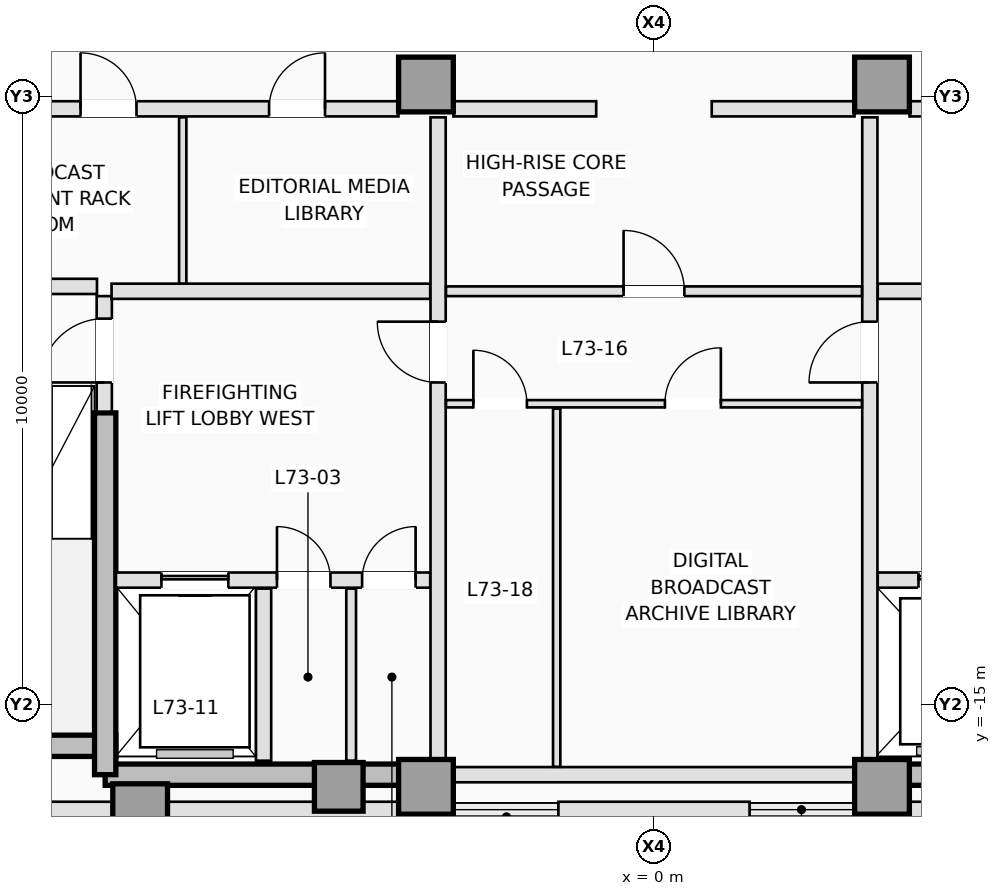
"""IFC4 building model, lengths in metres.
Left out: names, types, materials, properties, quantities, classifications, styles, units other than length and angle.
Written with IfcOpenShell. Run it as: python <this file> out.ifc"""

import sys

from ifc_helpers import new_model, si_unit, direction, frame, frame_2d, origin, origin_2d, place, context, subcontext, project, spatial, rectangle, extrude, element, fill, save


model = new_model("IFC4")
c1 = context("Model", 3, precision=1e-05, world=origin(), true_north=direction((0.0, 1.0)))
c2 = subcontext(c1, "Body", "Model", "MODEL_VIEW")
j1 = project(units=[si_unit("LENGTHUNIT", "METRE"), si_unit("PLANEANGLEUNIT", "RADIAN")], contexts=[c1])
p1 = place(None, origin())
s1 = spatial("IfcSite", under=j1, at=p1, CompositionType="ELEMENT")
p2 = place(p1, origin())
s2 = spatial("IfcBuilding", under=s1, at=p2, CompositionType="ELEMENT")
p3 = place(p2, frame((0.0, 0.0, 263.9)))
s3 = spatial("IfcBuildingStorey", under=s2, at=p3, CompositionType="ELEMENT", Elevation=263.9)
p4 = place(p3, frame((-12.55, -15.675, 0.0), z_axis=(0.0, 0.0, 1.0), x_axis=(1.0, 0.0, 0.0)))
e1 = element("IfcWall", 1, at=p4, inside=s3, PredefinedType="SHEAR", context=c2, shape_type="SweptSolid", body=[
    extrude(rectangle(XDim=3.7, YDim=0.35, at=frame_2d((1.85, 0.0))), origin(), (0.0, 0.0, 1.0), 3.5),
])
for number, where, z_axis, x_axis in (
    (2, (-9.025, -16.15, 0.0), (0.0, 0.0, 1.0), (1.0, 0.0, 0.0)),
    (3, (3.75, -16.15, 0.0), (0.0, 0.0, 1.0), (1.0, 0.0, 0.0)),
):
    element("IfcWall", number, at=place(p3, frame(where, z_axis=z_axis, x_axis=x_axis)), inside=s3, PredefinedType="SHEAR", context=c2, shape_type="SweptSolid", body=[
        extrude(rectangle(XDim=5.275, YDim=0.35, at=frame_2d((2.637, 0.0))), origin(), (0.0, 0.0, 1.0), 3.5),
    ])
p5 = place(p3, frame((-9.025, -16.15, 0.0), z_axis=(0.0, 0.0, 1.0), x_axis=(0.0, 1.0, 0.0)))
e4 = element("IfcWall", 4, at=p5, inside=s3, PredefinedType="SHEAR", context=c2, shape_type="SweptSolid", body=[
    extrude(rectangle(XDim=5.95, YDim=0.35, at=frame_2d((2.975, 0.0))), origin(), (0.0, 0.0, 1.0), 3.5),
])
for number, where, z_axis, x_axis in (
    (5, (-8.45, -16.75, 0.0), (0.0, 0.0, 1.0), (1.0, 0.0, 0.0)),
    (6, (-3.75, -16.35, 0.0), (0.0, 0.0, 1.0), (1.0, 0.0, 0.0)),
    (7, (3.75, -16.35, 0.0), (0.0, 0.0, 1.0), (1.0, 0.0, 0.0)),
    (8, (-3.75, -4.8, 0.0), (0.0, 0.0, 1.0), (1.0, 0.0, 0.0)),
    (9, (3.75, -4.8, 0.0), (0.0, 0.0, 1.0), (1.0, 0.0, 0.0)),
):
    element("IfcColumn", number, at=place(p3, frame(where, z_axis=z_axis, x_axis=x_axis)), inside=s3, PredefinedType="COLUMN", context=c2, shape_type="SweptSolid", body=[
        extrude(rectangle(XDim=0.9, YDim=0.9, at=origin_2d()), origin(), (0.0, 0.0, 1.0), 3.5),
    ])
p6 = place(p3, frame((-5.184, -16.35, 0.0), z_axis=(0.0, 0.0, 1.0), x_axis=(0.0, 1.0, 0.0)))
e10 = element("IfcColumn", 10, at=p6, inside=s3, PredefinedType="COLUMN", context=c2, shape_type="SweptSolid", body=[
    extrude(rectangle(XDim=0.8, YDim=0.8, at=origin_2d()), origin(), (0.0, 0.0, 1.0), 3.5),
])
for number, where, z_axis, x_axis in (
    (11, (15.493, -16.725, 0.0), (0.0, 0.0, 1.0), (-1.0, 0.0, 0.0)),
    (12, (-4.22, -16.725, 0.0), (0.0, 0.0, 1.0), (-1.0, 0.0, 0.0)),
):
    element("IfcWall", number, at=place(p3, frame(where, z_axis=z_axis, x_axis=x_axis)), inside=s3, PredefinedType="STANDARD", context=c2, shape_type="SweptSolid", body=[
        extrude(rectangle(XDim=11.273, YDim=0.26, at=frame_2d((5.636, 0.0))), origin(), (0.0, 0.0, 1.0), 2.79),
    ])
p7 = place(p3, frame((1.572, -16.725, 0.0), z_axis=(0.0, 0.0, 1.0), x_axis=(-1.0, 0.0, 0.0)))
e13 = element("IfcWall", 13, at=p7, inside=s3, PredefinedType="STANDARD", context=c2, shape_type="SweptSolid", body=[
    extrude(rectangle(XDim=3.143, YDim=0.26, at=frame_2d((1.572, 0.0))), origin(), (0.0, 0.0, 1.0), 3.25),
])
p8 = place(p3, frame((-9.04, -10.18, 0.0), z_axis=(0.0, 0.0, 1.0), x_axis=(0.0, 1.0, 0.0)))
e14 = element("IfcWall", 14, at=p8, inside=s3, PredefinedType="PARTITIONING", context=c2, shape_type="SweptSolid", body=[
    extrude(rectangle(XDim=1.9, YDim=0.25, at=frame_2d((0.95, 0.0))), origin(), (0.0, 0.0, 1.0), 3.25),
])
p9 = place(p8, frame((0.48, 0.0, 0.0)))
e15 = element("IfcOpeningElement", 15, at=p9, cuts=e14, PredefinedType="OPENING", context=c2, shape_type="SweptSolid", body=[
    extrude(rectangle(XDim=1.05, YDim=2.15, at=frame_2d((0.525, 1.075))), frame((0.0, 0.135, 0.0), z_axis=(0.0, -1.0, 0.0), x_axis=(1.0, 0.0, 0.0)), (0.0, 0.0, 1.0), 0.27),
])
p10 = place(p3, frame((-12.38, -8.12, 0.0), z_axis=(0.0, 0.0, 1.0), x_axis=(1.0, 0.0, 0.0)))
e16 = element("IfcWall", 16, at=p10, inside=s3, PredefinedType="PARTITIONING", context=c2, shape_type="SweptSolid", body=[
    extrude(rectangle(XDim=3.22, YDim=0.25, at=frame_2d((1.61, 0.0))), origin(), (0.0, 0.0, 1.0), 3.25),
])
p11 = place(p3, frame((-8.848, -12.95, 0.0), z_axis=(0.0, 0.0, 1.0), x_axis=(1.0, 0.0, 0.0)))
e17 = element("IfcWall", 17, at=p11, inside=s3, PredefinedType="PARTITIONING", context=c2, shape_type="SweptSolid", body=[
    extrude(rectangle(XDim=5.168, YDim=0.25, at=frame_2d((2.584, 0.0))), origin(), (0.0, 0.0, 1.0), 3.25),
])
p12 = place(p11, frame((0.748, 0.0, 0.0)))
e18 = element("IfcOpeningElement", 18, at=p12, cuts=e17, PredefinedType="OPENING", context=c2, shape_type="SweptSolid", body=[
    extrude(rectangle(XDim=1.1, YDim=2.15, at=frame_2d((0.55, 1.075))), frame((0.0, 0.135, 0.0), z_axis=(0.0, -1.0, 0.0), x_axis=(1.0, 0.0, 0.0)), (0.0, 0.0, 1.0), 0.27),
])
p13 = place(p11, frame((2.648, 0.0, 0.0)))
e19 = element("IfcOpeningElement", 19, at=p13, cuts=e17, PredefinedType="OPENING", context=c2, shape_type="SweptSolid", body=[
    extrude(rectangle(XDim=0.88, YDim=2.1, at=frame_2d((0.44, 1.05))), frame((0.0, 0.135, 0.0), z_axis=(0.0, -1.0, 0.0), x_axis=(1.0, 0.0, 0.0)), (0.0, 0.0, 1.0), 0.27),
])
p14 = place(p11, frame((4.048, 0.0, 0.0)))
e20 = element("IfcOpeningElement", 20, at=p14, cuts=e17, PredefinedType="OPENING", context=c2, shape_type="SweptSolid", body=[
    extrude(rectangle(XDim=0.88, YDim=2.1, at=frame_2d((0.44, 1.05))), frame((0.0, 0.135, 0.0), z_axis=(0.0, -1.0, 0.0), x_axis=(1.0, 0.0, 0.0)), (0.0, 0.0, 1.0), 0.27),
])
p15 = place(p3, frame((3.68, -12.95, 0.0), z_axis=(0.0, 0.0, 1.0), x_axis=(1.0, 0.0, 0.0)))
e21 = element("IfcWall", 21, at=p15, inside=s3, PredefinedType="PARTITIONING", context=c2, shape_type="SweptSolid", body=[
    extrude(rectangle(XDim=5.168, YDim=0.25, at=frame_2d((2.584, 0.0))), origin(), (0.0, 0.0, 1.0), 3.25),
])
p16 = place(p15, frame((3.32, 0.0, 0.0)))
e22 = element("IfcOpeningElement", 22, at=p16, cuts=e21, PredefinedType="OPENING", context=c2, shape_type="SweptSolid", body=[
    extrude(rectangle(XDim=1.1, YDim=2.15, at=frame_2d((0.55, 1.075))), frame((0.0, 0.135, 0.0), z_axis=(0.0, -1.0, 0.0), x_axis=(1.0, 0.0, 0.0)), (0.0, 0.0, 1.0), 0.27),
])
p17 = place(p15, frame((0.67, 0.0, 0.0)))
e23 = element("IfcOpeningElement", 23, at=p17, cuts=e21, PredefinedType="OPENING", context=c2, shape_type="SweptSolid", body=[
    extrude(rectangle(XDim=1.2, YDim=2.15, at=frame_2d((0.6, 1.075))), frame((0.0, 0.135, 0.0), z_axis=(0.0, -1.0, 0.0), x_axis=(1.0, 0.0, 0.0)), (0.0, 0.0, 1.0), 0.27),
])
p18 = place(p3, frame((-6.42, -15.92, 0.0), z_axis=(0.0, 0.0, 1.0), x_axis=(0.0, 1.0, 0.0)))
e24 = element("IfcWall", 24, at=p18, inside=s3, PredefinedType="PARTITIONING", context=c2, shape_type="SweptSolid", body=[
    extrude(rectangle(XDim=2.83, YDim=0.25, at=frame_2d((1.415, 0.0))), origin(), (0.0, 0.0, 1.0), 3.25),
])
p19 = place(p3, frame((-4.98, -15.92, 0.0), z_axis=(0.0, 0.0, 1.0), x_axis=(0.0, 1.0, 0.0)))
e25 = element("IfcWall", 25, at=p19, inside=s3, PredefinedType="PARTITIONING", context=c2, shape_type="SweptSolid", body=[
    extrude(rectangle(XDim=2.83, YDim=0.16, at=frame_2d((1.415, 0.0))), origin(), (0.0, 0.0, 1.0), 3.25),
])
for number, where, z_axis, x_axis in (
    (26, (-8.92, -8.2, 0.0), (0.0, 0.0, 1.0), (1.0, 0.0, 0.0)),
    (27, (3.68, -8.2, 0.0), (0.0, 0.0, 1.0), (1.0, 0.0, 0.0)),
):
    element("IfcWall", number, at=place(p3, frame(where, z_axis=z_axis, x_axis=x_axis)), inside=s3, PredefinedType="PARTITIONING", context=c2, shape_type="SweptSolid", body=[
        extrude(rectangle(XDim=5.24, YDim=0.25, at=frame_2d((2.62, 0.0))), origin(), (0.0, 0.0, 1.0), 3.25),
    ])
p20 = place(p3, frame((-3.55, -15.898, 0.0), z_axis=(0.0, 0.0, 1.0), x_axis=(0.0, 1.0, 0.0)))
e28 = element("IfcWall", 28, at=p20, inside=s3, PredefinedType="PARTITIONING", context=c2, shape_type="SweptSolid", body=[
    extrude(rectangle(XDim=10.558, YDim=0.25, at=frame_2d((5.279, 0.0))), origin(), (0.0, 0.0, 1.0), 3.25),
])
p21 = place(p20, frame((6.198, 0.0, 0.0)))
e29 = element("IfcOpeningElement", 29, at=p21, cuts=e28, PredefinedType="OPENING", context=c2, shape_type="SweptSolid", body=[
    extrude(rectangle(XDim=1.0, YDim=2.15, at=frame_2d((0.5, 1.075))), frame((0.0, 0.135, 0.0), z_axis=(0.0, -1.0, 0.0), x_axis=(1.0, 0.0, 0.0)), (0.0, 0.0, 1.0), 0.27),
])
p22 = place(p3, frame((3.55, -15.898, 0.0), z_axis=(0.0, 0.0, 1.0), x_axis=(0.0, 1.0, 0.0)))
e30 = element("IfcWall", 30, at=p22, inside=s3, PredefinedType="PARTITIONING", context=c2, shape_type="SweptSolid", body=[
    extrude(rectangle(XDim=10.558, YDim=0.25, at=frame_2d((5.279, 0.0))), origin(), (0.0, 0.0, 1.0), 3.25),
])
p23 = place(p22, frame((6.198, 0.0, 0.0)))
e31 = element("IfcOpeningElement", 31, at=p23, cuts=e30, PredefinedType="OPENING", context=c2, shape_type="SweptSolid", body=[
    extrude(rectangle(XDim=1.0, YDim=2.15, at=frame_2d((0.5, 1.075))), frame((0.0, 0.135, 0.0), z_axis=(0.0, -1.0, 0.0), x_axis=(1.0, 0.0, 0.0)), (0.0, 0.0, 1.0), 0.27),
])
p24 = place(p3, frame((-12.48, -5.2, 0.0), z_axis=(0.0, 0.0, 1.0), x_axis=(1.0, 0.0, 0.0)))
e32 = element("IfcWall", 32, at=p24, inside=s3, PredefinedType="PARTITIONING", context=c2, shape_type="SweptSolid", body=[
    extrude(rectangle(XDim=8.278, YDim=0.25, at=frame_2d((4.139, 0.0))), origin(), (0.0, 0.0, 1.0), 3.25),
])
p25 = place(p24, frame((3.05, 0.0, 0.0)))
e33 = element("IfcOpeningElement", 33, at=p25, cuts=e32, PredefinedType="OPENING", context=c2, shape_type="SweptSolid", body=[
    extrude(rectangle(XDim=0.92, YDim=2.12, at=frame_2d((0.46, 1.06))), frame((0.0, 0.135, 0.0), z_axis=(0.0, -1.0, 0.0), x_axis=(1.0, 0.0, 0.0)), (0.0, 0.0, 1.0), 0.27),
])
p26 = place(p24, frame((6.15, 0.0, 0.0)))
e34 = element("IfcOpeningElement", 34, at=p26, cuts=e32, PredefinedType="OPENING", context=c2, shape_type="SweptSolid", body=[
    extrude(rectangle(XDim=0.92, YDim=2.12, at=frame_2d((0.46, 1.06))), frame((0.0, 0.135, 0.0), z_axis=(0.0, -1.0, 0.0), x_axis=(1.0, 0.0, 0.0)), (0.0, 0.0, 1.0), 0.27),
])
p27 = place(p3, frame((4.202, -5.2, 0.0), z_axis=(0.0, 0.0, 1.0), x_axis=(1.0, 0.0, 0.0)))
e35 = element("IfcWall", 35, at=p27, inside=s3, PredefinedType="PARTITIONING", context=c2, shape_type="SweptSolid", body=[
    extrude(rectangle(XDim=8.278, YDim=0.25, at=frame_2d((4.139, 0.0))), origin(), (0.0, 0.0, 1.0), 3.25),
])
p28 = place(p27, frame((0.748, 0.0, 0.0)))
e36 = element("IfcOpeningElement", 36, at=p28, cuts=e35, PredefinedType="OPENING", context=c2, shape_type="SweptSolid", body=[
    extrude(rectangle(XDim=1.0, YDim=2.15, at=frame_2d((0.5, 1.075))), frame((0.0, 0.135, 0.0), z_axis=(0.0, -1.0, 0.0), x_axis=(1.0, 0.0, 0.0)), (0.0, 0.0, 1.0), 0.27),
])
p29 = place(p27, frame((2.698, 0.0, 0.0)))
e37 = element("IfcOpeningElement", 37, at=p29, cuts=e35, PredefinedType="OPENING", context=c2, shape_type="SweptSolid", body=[
    extrude(rectangle(XDim=1.0, YDim=2.15, at=frame_2d((0.5, 1.075))), frame((0.0, 0.135, 0.0), z_axis=(0.0, -1.0, 0.0), x_axis=(1.0, 0.0, 0.0)), (0.0, 0.0, 1.0), 0.27),
])
p30 = place(p27, frame((4.648, 0.0, 0.0)))
e38 = element("IfcOpeningElement", 38, at=p30, cuts=e35, PredefinedType="OPENING", context=c2, shape_type="SweptSolid", body=[
    extrude(rectangle(XDim=1.0, YDim=2.15, at=frame_2d((0.5, 1.075))), frame((0.0, 0.135, 0.0), z_axis=(0.0, -1.0, 0.0), x_axis=(1.0, 0.0, 0.0)), (0.0, 0.0, 1.0), 0.27),
])
p31 = place(p27, frame((6.598, 0.0, 0.0)))
e39 = element("IfcOpeningElement", 39, at=p31, cuts=e35, PredefinedType="OPENING", context=c2, shape_type="SweptSolid", body=[
    extrude(rectangle(XDim=1.0, YDim=2.15, at=frame_2d((0.5, 1.075))), frame((0.0, 0.135, 0.0), z_axis=(0.0, -1.0, 0.0), x_axis=(1.0, 0.0, 0.0)), (0.0, 0.0, 1.0), 0.27),
])
for number, where, z_axis, x_axis in (
    (40, (-3.298, -5.2, 0.0), (0.0, 0.0, 1.0), (1.0, 0.0, 0.0)),
    (41, (0.95, -5.2, 0.0), (0.0, 0.0, 1.0), (1.0, 0.0, 0.0)),
):
    element("IfcWall", number, at=place(p3, frame(where, z_axis=z_axis, x_axis=x_axis)), inside=s3, PredefinedType="PARTITIONING", context=c2, shape_type="SweptSolid", body=[
        extrude(rectangle(XDim=2.348, YDim=0.25, at=frame_2d((1.174, 0.0))), origin(), (0.0, 0.0, 1.0), 3.25),
    ])
p32 = place(p3, frame((-7.75, -8.073, 0.0), z_axis=(0.0, 0.0, 1.0), x_axis=(0.0, 1.0, 0.0)))
e42 = element("IfcWall", 42, at=p32, inside=s3, PredefinedType="PARTITIONING", context=c2, shape_type="SweptSolid", body=[
    extrude(rectangle(XDim=2.733, YDim=0.12, at=frame_2d((1.366, 0.0))), origin(), (0.0, 0.0, 1.0), 3.25),
])
p33 = place(p3, frame((-3.298, -16.15, 0.0), z_axis=(0.0, 0.0, 1.0), x_axis=(1.0, 0.0, 0.0)))
e43 = element("IfcWall", 43, at=p33, inside=s3, PredefinedType="PARTITIONING", context=c2, shape_type="SweptSolid", body=[
    extrude(rectangle(XDim=6.596, YDim=0.25, at=frame_2d((3.298, 0.0))), origin(), (0.0, 0.0, 1.0), 2.844),
])
p34 = place(p3, frame((-3.42, -8.2, 0.0), z_axis=(0.0, 0.0, 1.0), x_axis=(1.0, 0.0, 0.0)))
e44 = element("IfcWall", 44, at=p34, inside=s3, PredefinedType="PARTITIONING", context=c2, shape_type="SweptSolid", body=[
    extrude(rectangle(XDim=6.84, YDim=0.16, at=frame_2d((3.42, 0.0))), origin(), (0.0, 0.0, 1.0), 3.25),
])
p35 = place(p34, frame((2.92, 0.0, 0.0)))
e45 = element("IfcOpeningElement", 45, at=p35, cuts=e44, PredefinedType="OPENING", context=c2, shape_type="SweptSolid", body=[
    extrude(rectangle(XDim=1.0, YDim=2.15, at=frame_2d((0.5, 1.075))), frame((0.0, 0.09, 0.0), z_axis=(0.0, -1.0, 0.0), x_axis=(1.0, 0.0, 0.0)), (0.0, 0.0, 1.0), 0.18),
])
p36 = place(p3, frame((-3.42, -10.05, 0.0), z_axis=(0.0, 0.0, 1.0), x_axis=(1.0, 0.0, 0.0)))
e46 = element("IfcWall", 46, at=p36, inside=s3, PredefinedType="PARTITIONING", context=c2, shape_type="SweptSolid", body=[
    extrude(rectangle(XDim=6.84, YDim=0.12, at=frame_2d((3.42, 0.0))), origin(), (0.0, 0.0, 1.0), 3.25),
])
p37 = place(p36, frame((0.45, 0.0, 0.0)))
e47 = element("IfcOpeningElement", 47, at=p37, cuts=e46, PredefinedType="OPENING", context=c2, shape_type="SweptSolid", body=[
    extrude(rectangle(XDim=0.88, YDim=2.12, at=frame_2d((0.44, 1.06))), frame((0.0, 0.07, 0.0), z_axis=(0.0, -1.0, 0.0), x_axis=(1.0, 0.0, 0.0)), (0.0, 0.0, 1.0), 0.14),
])
p38 = place(p36, frame((3.6, 0.0, 0.0)))
e48 = element("IfcOpeningElement", 48, at=p38, cuts=e46, PredefinedType="OPENING", context=c2, shape_type="SweptSolid", body=[
    extrude(rectangle(XDim=0.92, YDim=2.12, at=frame_2d((0.46, 1.06))), frame((0.0, 0.07, 0.0), z_axis=(0.0, -1.0, 0.0), x_axis=(1.0, 0.0, 0.0)), (0.0, 0.0, 1.0), 0.14),
])
p39 = place(p3, frame((-1.6, -16.02, 0.0), z_axis=(0.0, 0.0, 1.0), x_axis=(0.0, 1.0, 0.0)))
e49 = element("IfcWall", 49, at=p39, inside=s3, PredefinedType="PARTITIONING", context=c2, shape_type="SweptSolid", body=[
    extrude(rectangle(XDim=5.89, YDim=0.12, at=frame_2d((2.945, 0.0))), origin(), (0.0, 0.0, 1.0), 3.25),
])
p40 = place(p12, origin())
e50 = element("IfcDoor", 50, at=p40, inside=s3, OperationType="SLIDING_TO_LEFT", PredefinedType="DOOR", context=c2, shape_type="SweptSolid", body=[
    extrude(rectangle(XDim=1.1, YDim=2.15, at=frame_2d((0.55, 1.075))), frame((0.0, 0.025, 0.0), z_axis=(0.0, -1.0, 0.0), x_axis=(1.0, 0.0, 0.0)), (0.0, 0.0, 1.0), 0.05),
])
fill(e18, e50)
p41 = place(p17, origin())
e51 = element("IfcDoor", 51, at=p41, inside=s3, OperationType="SLIDING_TO_LEFT", PredefinedType="DOOR", context=c2, shape_type="SweptSolid", body=[
    extrude(rectangle(XDim=1.2, YDim=2.15, at=frame_2d((0.6, 1.075))), frame((0.0, 0.025, 0.0), z_axis=(0.0, -1.0, 0.0), x_axis=(1.0, 0.0, 0.0)), (0.0, 0.0, 1.0), 0.05),
])
fill(e23, e51)
p42 = place(p9, origin())
e52 = element("IfcDoor", 52, at=p42, inside=s3, OperationType="SINGLE_SWING_LEFT", PredefinedType="DOOR", context=c2, shape_type="SweptSolid", body=[
    extrude(rectangle(XDim=1.05, YDim=2.15, at=frame_2d((0.525, 1.075))), frame((0.0, 0.025, 0.0), z_axis=(0.0, -1.0, 0.0), x_axis=(1.0, 0.0, 0.0)), (0.0, 0.0, 1.0), 0.05),
])
fill(e15, e52)
p43 = place(p13, origin())
e53 = element("IfcDoor", 53, at=p43, inside=s3, OperationType="SINGLE_SWING_LEFT", PredefinedType="TRAPDOOR", context=c2, shape_type="SweptSolid", body=[
    extrude(rectangle(XDim=0.88, YDim=2.1, at=frame_2d((0.44, 1.05))), frame((0.0, 0.025, 0.0), z_axis=(0.0, -1.0, 0.0), x_axis=(1.0, 0.0, 0.0)), (0.0, 0.0, 1.0), 0.05),
])
fill(e19, e53)
p44 = place(p14, origin())
e54 = element("IfcDoor", 54, at=p44, inside=s3, OperationType="SINGLE_SWING_RIGHT", PredefinedType="TRAPDOOR", context=c2, shape_type="SweptSolid", body=[
    extrude(rectangle(XDim=0.88, YDim=2.1, at=frame_2d((0.44, 1.05))), frame((0.0, 0.025, 0.0), z_axis=(0.0, -1.0, 0.0), x_axis=(1.0, 0.0, 0.0)), (0.0, 0.0, 1.0), 0.05),
])
fill(e20, e54)
p45 = place(p21, origin())
e55 = element("IfcDoor", 55, at=p45, inside=s3, OperationType="SINGLE_SWING_RIGHT", PredefinedType="DOOR", context=c2, shape_type="SweptSolid", body=[
    extrude(rectangle(XDim=1.0, YDim=2.15, at=frame_2d((0.5, 1.075))), frame((0.0, 0.025, 0.0), z_axis=(0.0, -1.0, 0.0), x_axis=(1.0, 0.0, 0.0)), (0.0, 0.0, 1.0), 0.05),
])
fill(e29, e55)
p46 = place(p23, origin())
e56 = element("IfcDoor", 56, at=p46, inside=s3, OperationType="SINGLE_SWING_LEFT", PredefinedType="DOOR", context=c2, shape_type="SweptSolid", body=[
    extrude(rectangle(XDim=1.0, YDim=2.15, at=frame_2d((0.5, 1.075))), frame((0.0, 0.025, 0.0), z_axis=(0.0, -1.0, 0.0), x_axis=(1.0, 0.0, 0.0)), (0.0, 0.0, 1.0), 0.05),
])
fill(e31, e56)
p47 = place(p25, origin())
e57 = element("IfcDoor", 57, at=p47, inside=s3, OperationType="SINGLE_SWING_LEFT", PredefinedType="DOOR", context=c2, shape_type="SweptSolid", body=[
    extrude(rectangle(XDim=0.92, YDim=2.12, at=frame_2d((0.46, 1.06))), frame((0.0, 0.025, 0.0), z_axis=(0.0, -1.0, 0.0), x_axis=(1.0, 0.0, 0.0)), (0.0, 0.0, 1.0), 0.05),
])
fill(e33, e57)
p48 = place(p26, origin())
e58 = element("IfcDoor", 58, at=p48, inside=s3, OperationType="SINGLE_SWING_RIGHT", PredefinedType="DOOR", context=c2, shape_type="SweptSolid", body=[
    extrude(rectangle(XDim=0.92, YDim=2.12, at=frame_2d((0.46, 1.06))), frame((0.0, 0.025, 0.0), z_axis=(0.0, -1.0, 0.0), x_axis=(1.0, 0.0, 0.0)), (0.0, 0.0, 1.0), 0.05),
])
fill(e34, e58)
p49 = place(p35, origin())
e59 = element("IfcDoor", 59, at=p49, inside=s3, OperationType="SINGLE_SWING_LEFT", PredefinedType="DOOR", context=c2, shape_type="SweptSolid", body=[
    extrude(rectangle(XDim=1.0, YDim=2.15, at=frame_2d((0.5, 1.075))), frame((0.0, 0.025, 0.0), z_axis=(0.0, -1.0, 0.0), x_axis=(1.0, 0.0, 0.0)), (0.0, 0.0, 1.0), 0.05),
])
fill(e45, e59)
p50 = place(p37, origin())
e60 = element("IfcDoor", 60, at=p50, inside=s3, OperationType="SINGLE_SWING_LEFT", PredefinedType="DOOR", context=c2, shape_type="SweptSolid", body=[
    extrude(rectangle(XDim=0.88, YDim=2.12, at=frame_2d((0.44, 1.06))), frame((0.0, 0.025, 0.0), z_axis=(0.0, -1.0, 0.0), x_axis=(1.0, 0.0, 0.0)), (0.0, 0.0, 1.0), 0.05),
])
fill(e47, e60)
p51 = place(p38, origin())
e61 = element("IfcDoor", 61, at=p51, inside=s3, OperationType="SINGLE_SWING_RIGHT", PredefinedType="DOOR", context=c2, shape_type="SweptSolid", body=[
    extrude(rectangle(XDim=0.92, YDim=2.12, at=frame_2d((0.46, 1.06))), frame((0.0, 0.025, 0.0), z_axis=(0.0, -1.0, 0.0), x_axis=(1.0, 0.0, 0.0)), (0.0, 0.0, 1.0), 0.05),
])
fill(e48, e61)
save(model, sys.argv[1])
